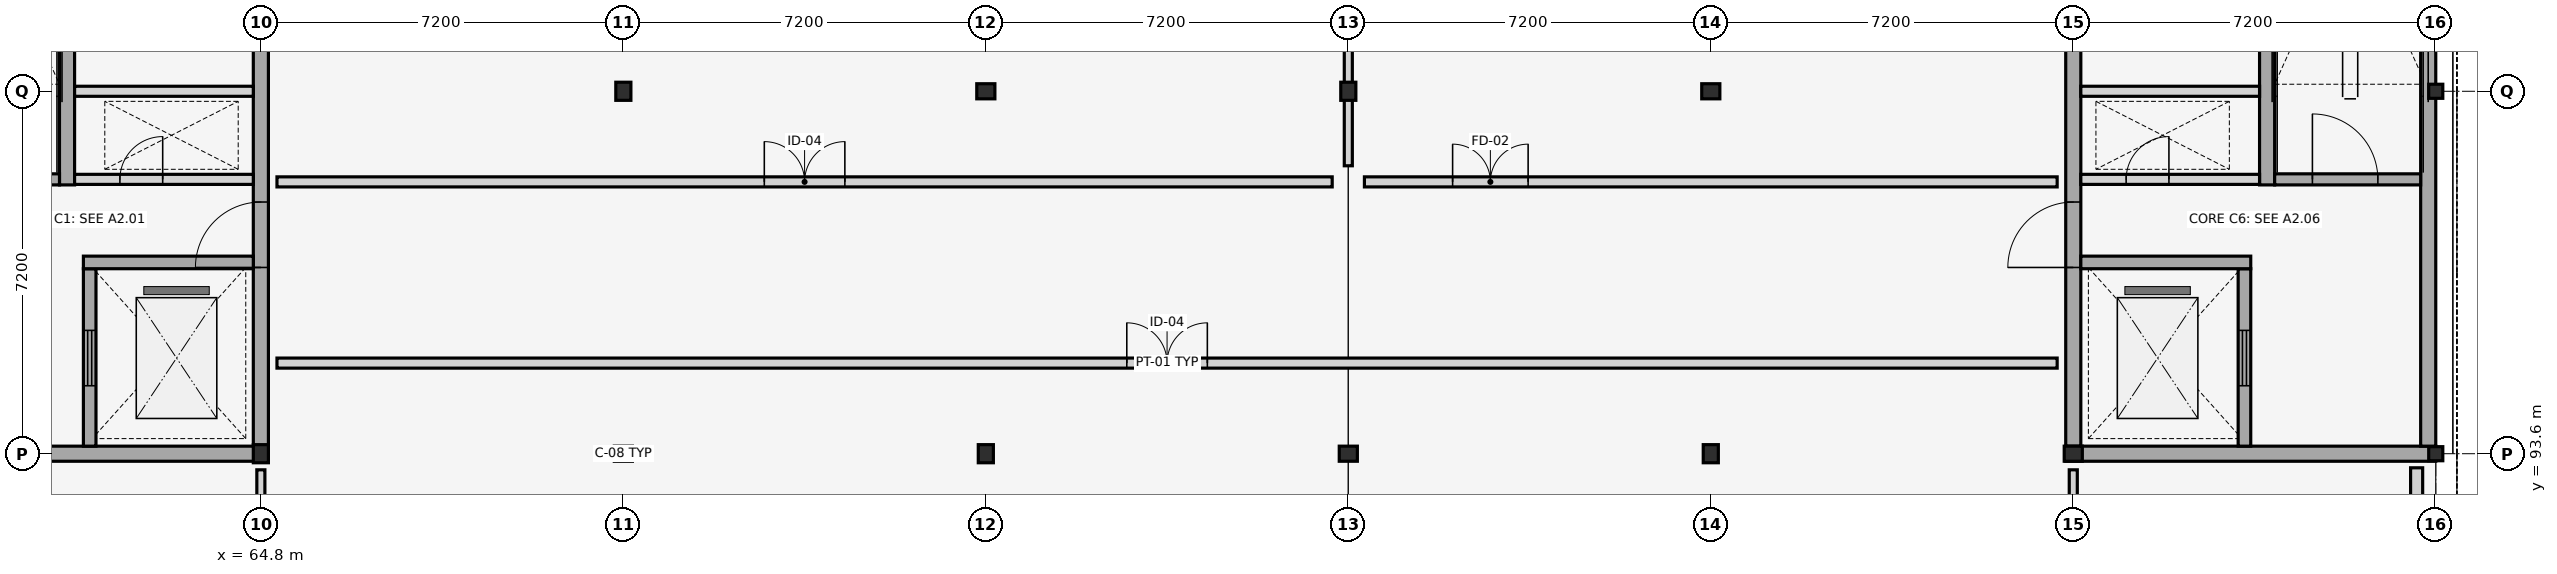
"""IFC4 building model, lengths in metres.
Left out: names, types, materials, properties, quantities, classifications, styles, units other than length and angle.
Written with IfcOpenShell. Run it as: python <this file> out.ifc"""

import sys

from ifc_helpers import new_model, si_unit, direction, frame, frame_2d, origin, origin_2d, place, context, subcontext, project, spatial, rectangle, i_section, extrude, element, fill, save


model = new_model("IFC4")
c1 = context("Model", 3, precision=1e-05, world=origin(), true_north=direction((0.0, 1.0)))
c2 = subcontext(c1, "Body", "Model", "MODEL_VIEW")
j1 = project(units=[si_unit("LENGTHUNIT", "METRE"), si_unit("PLANEANGLEUNIT", "RADIAN")], contexts=[c1])
p1 = place(None, origin())
s1 = spatial("IfcSite", under=j1, at=p1, CompositionType="ELEMENT")
p2 = place(p1, origin())
s2 = spatial("IfcBuilding", under=s1, at=p2, CompositionType="ELEMENT")
p3 = place(p2, frame((0.0, 0.0, 12.9)))
s3 = spatial("IfcBuildingStorey", under=s2, at=p3, CompositionType="ELEMENT", Elevation=12.9)
for number, where, z_axis, x_axis in (
    (1, (64.8, 93.6, 0.0), (0.0, 0.0, 1.0), (1.0, 0.0, 0.0)),
    (2, (72.0, 93.6, 0.0), (0.0, 0.0, 1.0), (0.0, 1.0, 0.0)),
    (3, (72.0, 100.8, 0.0), (0.0, 0.0, 1.0), (1.0, 0.0, 0.0)),
    (4, (79.2, 93.6, 0.0), (0.0, 0.0, 1.0), (1.0, 0.0, 0.0)),
    (5, (79.2, 100.8, 0.0), (0.0, 0.0, 1.0), (0.0, 1.0, 0.0)),
    (6, (86.4, 93.6, 0.0), (0.0, 0.0, 1.0), (0.0, 1.0, 0.0)),
    (7, (86.4, 100.8, 0.0), (0.0, 0.0, 1.0), (1.0, 0.0, 0.0)),
    (8, (93.6, 93.6, 0.0), (0.0, 0.0, 1.0), (1.0, 0.0, 0.0)),
    (9, (93.6, 100.8, 0.0), (0.0, 0.0, 1.0), (0.0, 1.0, 0.0)),
    (10, (100.8, 93.6, 0.0), (0.0, 0.0, 1.0), (0.0, 1.0, 0.0)),
):
    element("IfcColumn", number, at=place(p3, frame(where, z_axis=z_axis, x_axis=x_axis)), inside=s3, PredefinedType="COLUMN", context=c2, shape_type="SweptSolid", body=[
        extrude(i_section(OverallWidth=0.3, OverallDepth=0.36, WebThickness=0.012, FlangeThickness=0.022, FilletRadius=0.027, at=origin_2d()), origin(), (0.0, 0.0, 1.0), 4.2),
    ])
for number, where, z_axis, x_axis in (
    (11, (108.0, 93.6, 0.0), (0.0, 0.0, 1.0), (1.0, 0.0, 0.0)),
    (12, (108.0, 100.8, 0.0), (0.0, 0.0, 1.0), (0.0, 1.0, 0.0)),
):
    element("IfcColumn", number, at=place(p3, frame(where, z_axis=z_axis, x_axis=x_axis)), inside=s3, PredefinedType="COLUMN", context=c2, shape_type="SweptSolid", body=[
        extrude(i_section(OverallWidth=0.28, OverallDepth=0.28, WebThickness=0.01, FlangeThickness=0.018, FilletRadius=0.024, at=origin_2d()), origin(), (0.0, 0.0, 1.0), 4.2),
    ])
p4 = place(p3, frame((107.62, 86.68, 0.0), z_axis=(0.0, 0.0, 1.0), x_axis=(0.0, 1.0, 0.0)))
e13 = element("IfcWall", 13, at=p4, inside=s3, PredefinedType="STANDARD", context=c2, shape_type="SweptSolid", body=[
    extrude(rectangle(XDim=6.64, YDim=0.24, at=frame_2d((3.32, 0.0))), origin(), (0.0, 0.0, 1.0), 3.56),
])
p5 = place(p3, frame((57.6, 93.6, 0.0), z_axis=(0.0, 0.0, 1.0), x_axis=(1.0, 0.0, 0.0)))
e14 = element("IfcWall", 14, at=p5, inside=s3, PredefinedType="SHEAR", context=c2, shape_type="SweptSolid", body=[
    extrude(rectangle(XDim=7.35, YDim=0.3, at=frame_2d((3.675, 0.0))), origin(), (0.0, 0.0, 1.0), 3.96),
])
p6 = place(p3, frame((64.8, 93.75, 0.0), z_axis=(0.0, 0.0, 1.0), x_axis=(0.0, 1.0, 0.0)))
e15 = element("IfcWall", 15, at=p6, inside=s3, PredefinedType="SHEAR", context=c2, shape_type="SweptSolid", body=[
    extrude(rectangle(XDim=14.1, YDim=0.3, at=frame_2d((7.05, 0.0))), origin(), (0.0, 0.0, 1.0), 3.96),
])
p7 = place(p6, frame((3.55, 0.0, 0.0)))
e16 = element("IfcOpeningElement", 16, at=p7, cuts=e15, PredefinedType="OPENING", context=c2, shape_type="SweptSolid", body=[
    extrude(rectangle(XDim=1.3, YDim=2.2, at=frame_2d((0.65, 1.1))), frame((0.0, 0.16, 0.0), z_axis=(0.0, -1.0, 0.0), x_axis=(1.0, 0.0, 0.0)), (0.0, 0.0, 1.0), 0.32),
])
p8 = place(p6, frame((7.85, 0.0, 0.0)))
e17 = element("IfcOpeningElement", 17, at=p8, cuts=e15, PredefinedType="OPENING", context=c2, shape_type="SweptSolid", body=[
    extrude(rectangle(XDim=1.05, YDim=2.15, at=frame_2d((0.525, 1.075))), frame((0.0, 0.16, 0.0), z_axis=(0.0, -1.0, 0.0), x_axis=(1.0, 0.0, 0.0)), (0.0, 0.0, 1.0), 0.32),
])
p9 = place(p6, frame((10.55, 0.0, 0.0)))
e18 = element("IfcOpeningElement", 18, at=p9, cuts=e15, PredefinedType="OPENING", context=c2, shape_type="SweptSolid", body=[
    extrude(rectangle(XDim=1.0, YDim=2.15, at=frame_2d((0.5, 1.075))), frame((0.0, 0.16, 0.0), z_axis=(0.0, -1.0, 0.0), x_axis=(1.0, 0.0, 0.0)), (0.0, 0.0, 1.0), 0.32),
])
p10 = place(p3, frame((61.4, 93.75, 0.0), z_axis=(0.0, 0.0, 1.0), x_axis=(0.0, 1.0, 0.0)))
e19 = element("IfcWall", 19, at=p10, inside=s3, PredefinedType="SHEAR", context=c2, shape_type="SweptSolid", body=[
    extrude(rectangle(XDim=3.525, YDim=0.25, at=frame_2d((1.762, 0.0))), origin(), (0.0, 0.0, 1.0), 3.96),
])
p11 = place(p10, frame((1.2, 0.0, 0.0)))
e20 = element("IfcOpeningElement", 20, at=p11, cuts=e19, PredefinedType="OPENING", context=c2, shape_type="SweptSolid", body=[
    extrude(rectangle(XDim=1.1, YDim=2.15, at=frame_2d((0.55, 1.075))), frame((0.0, 0.135, 0.0), z_axis=(0.0, -1.0, 0.0), x_axis=(1.0, 0.0, 0.0)), (0.0, 0.0, 1.0), 0.27),
])
p12 = place(p3, frame((60.95, 98.94, 0.0), z_axis=(0.0, 0.0, 1.0), x_axis=(0.0, 1.0, 0.0)))
e21 = element("IfcWall", 21, at=p12, inside=s3, PredefinedType="SHEAR", context=c2, shape_type="SweptSolid", body=[
    extrude(rectangle(XDim=8.91, YDim=0.3, at=frame_2d((4.455, 0.0))), origin(), (0.0, 0.0, 1.0), 3.96),
])
p13 = place(p3, frame((61.1, 99.05, 0.0), z_axis=(0.0, 0.0, 1.0), x_axis=(1.0, 0.0, 0.0)))
e22 = element("IfcWall", 22, at=p13, inside=s3, PredefinedType="PLUMBINGWALL", context=c2, shape_type="SweptSolid", body=[
    extrude(rectangle(XDim=3.55, YDim=0.2, at=frame_2d((1.775, 0.0))), origin(), (0.0, 0.0, 1.0), 3.38),
])
p14 = place(p13, frame((0.9, 0.0, 0.0)))
e23 = element("IfcOpeningElement", 23, at=p14, cuts=e22, PredefinedType="OPENING", context=c2, shape_type="SweptSolid", body=[
    extrude(rectangle(XDim=0.85, YDim=2.05, at=frame_2d((0.425, 1.025))), frame((0.0, 0.11, 0.0), z_axis=(0.0, -1.0, 0.0), x_axis=(1.0, 0.0, 0.0)), (0.0, 0.0, 1.0), 0.22),
])
p15 = place(p3, frame((57.9, 99.05, 0.0), z_axis=(0.0, 0.0, 1.0), x_axis=(1.0, 0.0, 0.0)))
e24 = element("IfcWall", 24, at=p15, inside=s3, PredefinedType="SHEAR", context=c2, shape_type="SweptSolid", body=[
    extrude(rectangle(XDim=2.9, YDim=0.22, at=frame_2d((1.45, 0.0))), origin(), (0.0, 0.0, 1.0), 3.96),
])
p16 = place(p15, frame((0.75, 0.0, 0.0)))
e25 = element("IfcOpeningElement", 25, at=p16, cuts=e24, PredefinedType="OPENING", context=c2, shape_type="SweptSolid", body=[
    extrude(rectangle(XDim=1.3, YDim=2.2, at=frame_2d((0.65, 1.1))), frame((0.0, 0.12, 0.0), z_axis=(0.0, -1.0, 0.0), x_axis=(1.0, 0.0, 0.0)), (0.0, 0.0, 1.0), 0.24),
])
p17 = place(p3, frame((61.275, 97.4, 0.0), z_axis=(0.0, 0.0, 1.0), x_axis=(1.0, 0.0, 0.0)))
e26 = element("IfcWall", 26, at=p17, inside=s3, PredefinedType="SHEAR", context=c2, shape_type="SweptSolid", body=[
    extrude(rectangle(XDim=3.375, YDim=0.25, at=frame_2d((1.688, 0.0))), origin(), (0.0, 0.0, 1.0), 3.96),
])
p18 = place(p3, frame((61.1, 100.8, 0.0), z_axis=(0.0, 0.0, 1.0), x_axis=(1.0, 0.0, 0.0)))
e27 = element("IfcWall", 27, at=p18, inside=s3, PredefinedType="PLUMBINGWALL", context=c2, shape_type="SweptSolid", body=[
    extrude(rectangle(XDim=3.55, YDim=0.2, at=frame_2d((1.775, 0.0))), origin(), (0.0, 0.0, 1.0), 3.38),
])
p19 = place(p3, frame((100.65, 93.6, 0.0), z_axis=(0.0, 0.0, 1.0), x_axis=(1.0, 0.0, 0.0)))
e28 = element("IfcWall", 28, at=p19, inside=s3, PredefinedType="SHEAR", context=c2, shape_type="SweptSolid", body=[
    extrude(rectangle(XDim=7.35, YDim=0.3, at=frame_2d((3.675, 0.0))), origin(), (0.0, 0.0, 1.0), 3.96),
])
p20 = place(p3, frame((107.85, 93.75, 0.0), z_axis=(0.0, 0.0, 1.0), x_axis=(0.0, 1.0, 0.0)))
e29 = element("IfcWall", 29, at=p20, inside=s3, PredefinedType="SHEAR", context=c2, shape_type="SweptSolid", body=[
    extrude(rectangle(XDim=14.1, YDim=0.3, at=frame_2d((7.05, 0.0))), origin(), (0.0, 0.0, 1.0), 3.96),
])
p21 = place(p3, frame((100.8, 93.75, 0.0), z_axis=(0.0, 0.0, 1.0), x_axis=(0.0, 1.0, 0.0)))
e30 = element("IfcWall", 30, at=p21, inside=s3, PredefinedType="SHEAR", context=c2, shape_type="SweptSolid", body=[
    extrude(rectangle(XDim=14.1, YDim=0.3, at=frame_2d((7.05, 0.0))), origin(), (0.0, 0.0, 1.0), 3.96),
])
p22 = place(p21, frame((3.55, 0.0, 0.0)))
e31 = element("IfcOpeningElement", 31, at=p22, cuts=e30, PredefinedType="OPENING", context=c2, shape_type="SweptSolid", body=[
    extrude(rectangle(XDim=1.3, YDim=2.2, at=frame_2d((0.65, 1.1))), frame((0.0, 0.16, 0.0), z_axis=(0.0, -1.0, 0.0), x_axis=(1.0, 0.0, 0.0)), (0.0, 0.0, 1.0), 0.32),
])
p23 = place(p21, frame((7.85, 0.0, 0.0)))
e32 = element("IfcOpeningElement", 32, at=p23, cuts=e30, PredefinedType="OPENING", context=c2, shape_type="SweptSolid", body=[
    extrude(rectangle(XDim=1.05, YDim=2.15, at=frame_2d((0.525, 1.075))), frame((0.0, 0.16, 0.0), z_axis=(0.0, -1.0, 0.0), x_axis=(1.0, 0.0, 0.0)), (0.0, 0.0, 1.0), 0.32),
])
p24 = place(p21, frame((10.55, 0.0, 0.0)))
e33 = element("IfcOpeningElement", 33, at=p24, cuts=e30, PredefinedType="OPENING", context=c2, shape_type="SweptSolid", body=[
    extrude(rectangle(XDim=1.0, YDim=2.15, at=frame_2d((0.5, 1.075))), frame((0.0, 0.16, 0.0), z_axis=(0.0, -1.0, 0.0), x_axis=(1.0, 0.0, 0.0)), (0.0, 0.0, 1.0), 0.32),
])
p25 = place(p3, frame((104.2, 93.75, 0.0), z_axis=(0.0, 0.0, 1.0), x_axis=(0.0, 1.0, 0.0)))
e34 = element("IfcWall", 34, at=p25, inside=s3, PredefinedType="SHEAR", context=c2, shape_type="SweptSolid", body=[
    extrude(rectangle(XDim=3.525, YDim=0.25, at=frame_2d((1.762, 0.0))), origin(), (0.0, 0.0, 1.0), 3.96),
])
p26 = place(p25, frame((1.2, 0.0, 0.0)))
e35 = element("IfcOpeningElement", 35, at=p26, cuts=e34, PredefinedType="OPENING", context=c2, shape_type="SweptSolid", body=[
    extrude(rectangle(XDim=1.1, YDim=2.15, at=frame_2d((0.55, 1.075))), frame((0.0, 0.135, 0.0), z_axis=(0.0, -1.0, 0.0), x_axis=(1.0, 0.0, 0.0)), (0.0, 0.0, 1.0), 0.27),
])
p27 = place(p3, frame((104.65, 98.94, 0.0), z_axis=(0.0, 0.0, 1.0), x_axis=(0.0, 1.0, 0.0)))
e36 = element("IfcWall", 36, at=p27, inside=s3, PredefinedType="SHEAR", context=c2, shape_type="SweptSolid", body=[
    extrude(rectangle(XDim=8.91, YDim=0.3, at=frame_2d((4.455, 0.0))), origin(), (0.0, 0.0, 1.0), 3.96),
])
p28 = place(p3, frame((100.95, 99.05, 0.0), z_axis=(0.0, 0.0, 1.0), x_axis=(1.0, 0.0, 0.0)))
e37 = element("IfcWall", 37, at=p28, inside=s3, PredefinedType="PLUMBINGWALL", context=c2, shape_type="SweptSolid", body=[
    extrude(rectangle(XDim=3.55, YDim=0.2, at=frame_2d((1.775, 0.0))), origin(), (0.0, 0.0, 1.0), 3.38),
])
p29 = place(p28, frame((0.9, 0.0, 0.0)))
e38 = element("IfcOpeningElement", 38, at=p29, cuts=e37, PredefinedType="OPENING", context=c2, shape_type="SweptSolid", body=[
    extrude(rectangle(XDim=0.85, YDim=2.05, at=frame_2d((0.425, 1.025))), frame((0.0, 0.11, 0.0), z_axis=(0.0, -1.0, 0.0), x_axis=(1.0, 0.0, 0.0)), (0.0, 0.0, 1.0), 0.22),
])
p30 = place(p3, frame((104.8, 99.05, 0.0), z_axis=(0.0, 0.0, 1.0), x_axis=(1.0, 0.0, 0.0)))
e39 = element("IfcWall", 39, at=p30, inside=s3, PredefinedType="SHEAR", context=c2, shape_type="SweptSolid", body=[
    extrude(rectangle(XDim=2.9, YDim=0.22, at=frame_2d((1.45, 0.0))), origin(), (0.0, 0.0, 1.0), 3.96),
])
p31 = place(p30, frame((0.75, 0.0, 0.0)))
e40 = element("IfcOpeningElement", 40, at=p31, cuts=e39, PredefinedType="OPENING", context=c2, shape_type="SweptSolid", body=[
    extrude(rectangle(XDim=1.3, YDim=2.2, at=frame_2d((0.65, 1.1))), frame((0.0, 0.12, 0.0), z_axis=(0.0, -1.0, 0.0), x_axis=(1.0, 0.0, 0.0)), (0.0, 0.0, 1.0), 0.24),
])
p32 = place(p3, frame((100.95, 97.4, 0.0), z_axis=(0.0, 0.0, 1.0), x_axis=(1.0, 0.0, 0.0)))
e41 = element("IfcWall", 41, at=p32, inside=s3, PredefinedType="SHEAR", context=c2, shape_type="SweptSolid", body=[
    extrude(rectangle(XDim=3.375, YDim=0.25, at=frame_2d((1.688, 0.0))), origin(), (0.0, 0.0, 1.0), 3.96),
])
p33 = place(p3, frame((100.95, 100.8, 0.0), z_axis=(0.0, 0.0, 1.0), x_axis=(1.0, 0.0, 0.0)))
e42 = element("IfcWall", 42, at=p33, inside=s3, PredefinedType="PLUMBINGWALL", context=c2, shape_type="SweptSolid", body=[
    extrude(rectangle(XDim=3.55, YDim=0.2, at=frame_2d((1.775, 0.0))), origin(), (0.0, 0.0, 1.0), 3.38),
])
p34 = place(p3, frame((65.12, 95.4, 0.0), z_axis=(0.0, 0.0, 1.0), x_axis=(1.0, 0.0, 0.0)))
e43 = element("IfcWall", 43, at=p34, inside=s3, PredefinedType="PARTITIONING", context=c2, shape_type="SweptSolid", body=[
    extrude(rectangle(XDim=35.36, YDim=0.2, at=frame_2d((17.68, 0.0))), origin(), (0.0, 0.0, 1.0), 3.15),
])
p35 = place(p34, frame((16.88, 0.0, 0.0)))
e44 = element("IfcOpeningElement", 44, at=p35, cuts=e43, PredefinedType="OPENING", context=c2, shape_type="SweptSolid", body=[
    extrude(rectangle(XDim=1.6, YDim=2.35, at=frame_2d((0.8, 1.175))), frame((0.0, 0.11, 0.0), z_axis=(0.0, -1.0, 0.0), x_axis=(1.0, 0.0, 0.0)), (0.0, 0.0, 1.0), 0.22),
])
p36 = place(p3, frame((65.12, 99.0, 0.0), z_axis=(0.0, 0.0, 1.0), x_axis=(1.0, 0.0, 0.0)))
e45 = element("IfcWall", 45, at=p36, inside=s3, PredefinedType="PARTITIONING", context=c2, shape_type="SweptSolid", body=[
    extrude(rectangle(XDim=20.96, YDim=0.2, at=frame_2d((10.48, 0.0))), origin(), (0.0, 0.0, 1.0), 3.15),
])
p37 = place(p36, frame((9.68, 0.0, 0.0)))
e46 = element("IfcOpeningElement", 46, at=p37, cuts=e45, PredefinedType="OPENING", context=c2, shape_type="SweptSolid", body=[
    extrude(rectangle(XDim=1.6, YDim=2.35, at=frame_2d((0.8, 1.175))), frame((0.0, 0.11, 0.0), z_axis=(0.0, -1.0, 0.0), x_axis=(1.0, 0.0, 0.0)), (0.0, 0.0, 1.0), 0.22),
])
p38 = place(p3, frame((86.72, 99.0, 0.0), z_axis=(0.0, 0.0, 1.0), x_axis=(1.0, 0.0, 0.0)))
e47 = element("IfcWall", 47, at=p38, inside=s3, PredefinedType="PARTITIONING", context=c2, shape_type="SweptSolid", body=[
    extrude(rectangle(XDim=13.76, YDim=0.2, at=frame_2d((6.88, 0.0))), origin(), (0.0, 0.0, 1.0), 3.15),
])
p39 = place(p38, frame((1.752, 0.0, 0.0)))
e48 = element("IfcOpeningElement", 48, at=p39, cuts=e47, PredefinedType="OPENING", context=c2, shape_type="SweptSolid", body=[
    extrude(rectangle(XDim=1.5, YDim=2.25, at=frame_2d((0.75, 1.125))), frame((0.0, 0.11, 0.0), z_axis=(0.0, -1.0, 0.0), x_axis=(1.0, 0.0, 0.0)), (0.0, 0.0, 1.0), 0.22),
])
p40 = place(p3, frame((100.8, 86.72, 0.0), z_axis=(0.0, 0.0, 1.0), x_axis=(0.0, 1.0, 0.0)))
e49 = element("IfcWall", 49, at=p40, inside=s3, PredefinedType="PARTITIONING", context=c2, shape_type="SweptSolid", body=[
    extrude(rectangle(XDim=6.56, YDim=0.16, at=frame_2d((3.28, 0.0))), origin(), (0.0, 0.0, 1.0), 3.15),
])
p41 = place(p40, frame((2.605, 0.0, 0.0)))
e50 = element("IfcOpeningElement", 50, at=p41, cuts=e49, PredefinedType="OPENING", context=c2, shape_type="SweptSolid", body=[
    extrude(rectangle(XDim=1.35, YDim=2.35, at=frame_2d((0.675, 1.175))), frame((0.0, 0.09, 0.0), z_axis=(0.0, -1.0, 0.0), x_axis=(1.0, 0.0, 0.0)), (0.0, 0.0, 1.0), 0.18),
])
p42 = place(p3, frame((64.8, 86.72, 0.0), z_axis=(0.0, 0.0, 1.0), x_axis=(0.0, 1.0, 0.0)))
e51 = element("IfcWall", 51, at=p42, inside=s3, PredefinedType="PARTITIONING", context=c2, shape_type="SweptSolid", body=[
    extrude(rectangle(XDim=6.56, YDim=0.16, at=frame_2d((3.28, 0.0))), origin(), (0.0, 0.0, 1.0), 3.15),
])
p43 = place(p42, frame((2.505, 0.0, 0.0)))
e52 = element("IfcOpeningElement", 52, at=p43, cuts=e51, PredefinedType="OPENING", context=c2, shape_type="SweptSolid", body=[
    extrude(rectangle(XDim=1.55, YDim=2.4, at=frame_2d((0.775, 1.2))), frame((0.0, 0.09, 0.0), z_axis=(0.0, -1.0, 0.0), x_axis=(1.0, 0.0, 0.0)), (0.0, 0.0, 1.0), 0.18),
])
p44 = place(p3, frame((86.4, 99.32, 0.0), z_axis=(0.0, 0.0, 1.0), x_axis=(0.0, 1.0, 0.0)))
e53 = element("IfcWall", 53, at=p44, inside=s3, PredefinedType="PARTITIONING", context=c2, shape_type="SweptSolid", body=[
    extrude(rectangle(XDim=15.56, YDim=0.16, at=frame_2d((7.78, 0.0))), origin(), (0.0, 0.0, 1.0), 3.15),
])
p45 = place(p44, frame((3.015, 0.0, 0.0)))
e54 = element("IfcOpeningElement", 54, at=p45, cuts=e53, PredefinedType="OPENING", context=c2, shape_type="SweptSolid", body=[
    extrude(rectangle(XDim=1.75, YDim=2.45, at=frame_2d((0.875, 1.225))), frame((0.0, 0.09, 0.0), z_axis=(0.0, -1.0, 0.0), x_axis=(1.0, 0.0, 0.0)), (0.0, 0.0, 1.0), 0.18),
])
p46 = place(p7, origin())
e55 = element("IfcDoor", 55, at=p46, inside=s3, OperationType="SINGLE_SWING_LEFT", PredefinedType="DOOR", context=c2, shape_type="SweptSolid", body=[
    extrude(rectangle(XDim=1.3, YDim=2.2, at=frame_2d((0.65, 1.1))), frame((0.0, 0.025, 0.0), z_axis=(0.0, -1.0, 0.0), x_axis=(1.0, 0.0, 0.0)), (0.0, 0.0, 1.0), 0.05),
])
fill(e16, e55)
p47 = place(p11, origin())
e56 = element("IfcDoor", 56, at=p47, inside=s3, OperationType="SLIDING_TO_LEFT", PredefinedType="DOOR", context=c2, shape_type="SweptSolid", body=[
    extrude(rectangle(XDim=1.1, YDim=2.15, at=frame_2d((0.55, 1.075))), frame((0.0, 0.025, 0.0), z_axis=(0.0, -1.0, 0.0), x_axis=(1.0, 0.0, 0.0)), (0.0, 0.0, 1.0), 0.05),
])
fill(e20, e56)
p48 = place(p14, origin())
e57 = element("IfcDoor", 57, at=p48, inside=s3, OperationType="SINGLE_SWING_RIGHT", PredefinedType="TRAPDOOR", context=c2, shape_type="SweptSolid", body=[
    extrude(rectangle(XDim=0.85, YDim=2.05, at=frame_2d((0.425, 1.025))), frame((0.0, 0.025, 0.0), z_axis=(0.0, -1.0, 0.0), x_axis=(1.0, 0.0, 0.0)), (0.0, 0.0, 1.0), 0.05),
])
fill(e23, e57)
p49 = place(p22, origin())
e58 = element("IfcDoor", 58, at=p49, inside=s3, OperationType="SINGLE_SWING_LEFT", PredefinedType="DOOR", context=c2, shape_type="SweptSolid", body=[
    extrude(rectangle(XDim=1.3, YDim=2.2, at=frame_2d((0.65, 1.1))), frame((0.0, 0.025, 0.0), z_axis=(0.0, -1.0, 0.0), x_axis=(1.0, 0.0, 0.0)), (0.0, 0.0, 1.0), 0.05),
])
fill(e31, e58)
p50 = place(p26, origin())
e59 = element("IfcDoor", 59, at=p50, inside=s3, OperationType="SLIDING_TO_LEFT", PredefinedType="DOOR", context=c2, shape_type="SweptSolid", body=[
    extrude(rectangle(XDim=1.1, YDim=2.15, at=frame_2d((0.55, 1.075))), frame((0.0, 0.025, 0.0), z_axis=(0.0, -1.0, 0.0), x_axis=(1.0, 0.0, 0.0)), (0.0, 0.0, 1.0), 0.05),
])
fill(e35, e59)
p51 = place(p29, origin())
e60 = element("IfcDoor", 60, at=p51, inside=s3, OperationType="SINGLE_SWING_RIGHT", PredefinedType="TRAPDOOR", context=c2, shape_type="SweptSolid", body=[
    extrude(rectangle(XDim=0.85, YDim=2.05, at=frame_2d((0.425, 1.025))), frame((0.0, 0.025, 0.0), z_axis=(0.0, -1.0, 0.0), x_axis=(1.0, 0.0, 0.0)), (0.0, 0.0, 1.0), 0.05),
])
fill(e38, e60)
p52 = place(p31, origin())
e61 = element("IfcDoor", 61, at=p52, inside=s3, OperationType="SINGLE_SWING_LEFT", PredefinedType="DOOR", context=c2, shape_type="SweptSolid", body=[
    extrude(rectangle(XDim=1.3, YDim=2.2, at=frame_2d((0.65, 1.1))), frame((0.0, 0.025, 0.0), z_axis=(0.0, -1.0, 0.0), x_axis=(1.0, 0.0, 0.0)), (0.0, 0.0, 1.0), 0.05),
])
fill(e40, e61)
p53 = place(p35, origin())
e62 = element("IfcDoor", 62, at=p53, inside=s3, OperationType="DOUBLE_DOOR_SINGLE_SWING", PredefinedType="DOOR", context=c2, shape_type="SweptSolid", body=[
    extrude(rectangle(XDim=1.6, YDim=2.35, at=frame_2d((0.8, 1.175))), frame((0.0, 0.025, 0.0), z_axis=(0.0, -1.0, 0.0), x_axis=(1.0, 0.0, 0.0)), (0.0, 0.0, 1.0), 0.05),
])
fill(e44, e62)
p54 = place(p37, origin())
e63 = element("IfcDoor", 63, at=p54, inside=s3, OperationType="DOUBLE_DOOR_SINGLE_SWING", PredefinedType="DOOR", context=c2, shape_type="SweptSolid", body=[
    extrude(rectangle(XDim=1.6, YDim=2.35, at=frame_2d((0.8, 1.175))), frame((0.0, 0.025, 0.0), z_axis=(0.0, -1.0, 0.0), x_axis=(1.0, 0.0, 0.0)), (0.0, 0.0, 1.0), 0.05),
])
fill(e46, e63)
p55 = place(p39, origin())
e64 = element("IfcDoor", 64, at=p55, inside=s3, OperationType="DOUBLE_DOOR_SINGLE_SWING", PredefinedType="DOOR", context=c2, shape_type="SweptSolid", body=[
    extrude(rectangle(XDim=1.5, YDim=2.25, at=frame_2d((0.75, 1.125))), frame((0.0, 0.025, 0.0), z_axis=(0.0, -1.0, 0.0), x_axis=(1.0, 0.0, 0.0)), (0.0, 0.0, 1.0), 0.05),
])
fill(e48, e64)
save(model, sys.argv[1])
